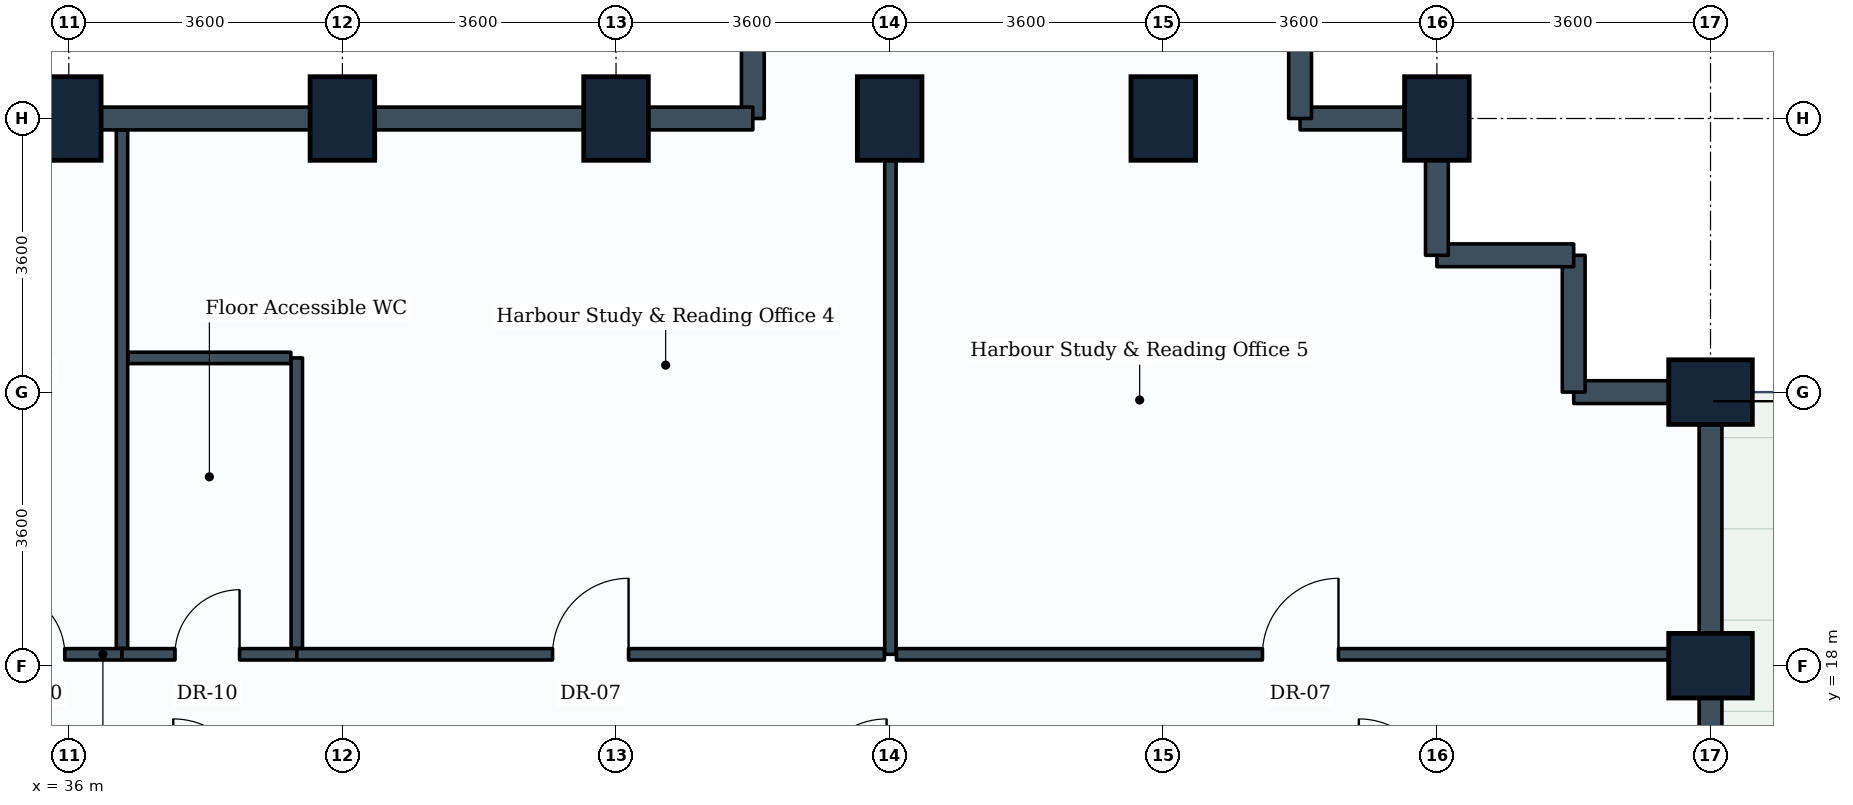
"""IFC4 building model, lengths in metres.
Left out: names, types, materials, properties, quantities, classifications, styles, units other than length and angle.
Written with IfcOpenShell. Run it as: python <this file> out.ifc"""

import sys

from ifc_helpers import new_model, si_unit, direction, frame, frame_2d, origin, origin_2d, place, context, subcontext, project, spatial, rectangle, extrude, element, fill, save


model = new_model("IFC4")
c1 = context("Model", 3, precision=1e-05, world=origin(), true_north=direction((0.0, 1.0)))
c2 = subcontext(c1, "Body", "Model", "MODEL_VIEW")
j1 = project(units=[si_unit("LENGTHUNIT", "METRE"), si_unit("PLANEANGLEUNIT", "RADIAN")], contexts=[c1])
p1 = place(None, origin())
s1 = spatial("IfcSite", under=j1, at=p1, CompositionType="ELEMENT")
p2 = place(p1, origin())
s2 = spatial("IfcBuilding", under=s1, at=p2, CompositionType="ELEMENT")
p3 = place(p2, frame((0.0, 0.0, 107.4)))
s3 = spatial("IfcBuildingStorey", under=s2, at=p3, CompositionType="ELEMENT", Elevation=107.4)
for number, where, z_axis, x_axis in (
    (1, (36.0, 25.2, 0.0), (0.0, 0.0, 1.0), (1.0, 0.0, 0.0)),
    (2, (39.6, 25.2, 0.0), (0.0, 0.0, 1.0), (1.0, 0.0, 0.0)),
    (3, (43.2, 25.2, 0.0), (0.0, 0.0, 1.0), (1.0, 0.0, 0.0)),
    (4, (46.8, 25.2, 0.0), (0.0, 0.0, 1.0), (1.0, 0.0, 0.0)),
    (5, (50.4, 25.2, 0.0), (0.0, 0.0, 1.0), (1.0, 0.0, 0.0)),
    (6, (54.0, 25.2, 0.0), (0.0, 0.0, 1.0), (1.0, 0.0, 0.0)),
    (7, (57.6, 18.0, 0.0), (0.0, 0.0, 1.0), (0.0, 1.0, 0.0)),
    (8, (57.6, 21.6, 0.0), (0.0, 0.0, 1.0), (0.0, 1.0, 0.0)),
):
    element("IfcColumn", number, at=place(p3, frame(where, z_axis=z_axis, x_axis=x_axis)), inside=s3, PredefinedType="COLUMN", context=c2, shape_type="SweptSolid", body=[
        extrude(rectangle(XDim=0.85, YDim=1.1, at=origin_2d()), origin(), (0.0, 0.0, 1.0), 3.9),
    ])
for number, where, z_axis, x_axis in (
    (9, (57.6, 18.0, 0.0), (0.0, 0.0, 1.0), (0.0, -1.0, 0.0)),
    (10, (57.6, 21.6, 0.0), (0.0, 0.0, 1.0), (0.0, -1.0, 0.0)),
):
    element("IfcWall", number, at=place(p3, frame(where, z_axis=z_axis, x_axis=x_axis)), inside=s3, PredefinedType="STANDARD", context=c2, shape_type="SweptSolid", body=[
        extrude(rectangle(XDim=3.6, YDim=0.3, at=frame_2d((1.8, 0.0))), origin(), (0.0, 0.0, 1.0), 2.93),
    ])
p4 = place(p3, frame((55.8, 21.6, 0.0), z_axis=(0.0, 0.0, 1.0), x_axis=(1.0, 0.0, 0.0)))
e11 = element("IfcWall", 11, at=p4, inside=s3, PredefinedType="STANDARD", context=c2, shape_type="SweptSolid", body=[
    extrude(rectangle(XDim=1.8, YDim=0.3, at=frame_2d((0.9, 0.0))), origin(), (0.0, 0.0, 1.0), 2.93),
])
p5 = place(p3, frame((55.8, 23.4, 0.0), z_axis=(0.0, 0.0, 1.0), x_axis=(0.0, -1.0, 0.0)))
e12 = element("IfcWall", 12, at=p5, inside=s3, PredefinedType="STANDARD", context=c2, shape_type="SweptSolid", body=[
    extrude(rectangle(XDim=1.8, YDim=0.3, at=frame_2d((0.9, 0.0))), origin(), (0.0, 0.0, 1.0), 3.635),
])
p6 = place(p3, frame((54.0, 23.4, 0.0), z_axis=(0.0, 0.0, 1.0), x_axis=(1.0, 0.0, 0.0)))
e13 = element("IfcWall", 13, at=p6, inside=s3, PredefinedType="STANDARD", context=c2, shape_type="SweptSolid", body=[
    extrude(rectangle(XDim=1.8, YDim=0.3, at=frame_2d((0.9, 0.0))), origin(), (0.0, 0.0, 1.0), 3.635),
])
for number, where, z_axis, x_axis in (
    (14, (54.0, 25.2, 0.0), (0.0, 0.0, 1.0), (0.0, -1.0, 0.0)),
    (15, (52.2, 25.2, 0.0), (0.0, 0.0, 1.0), (1.0, 0.0, 0.0)),
):
    element("IfcWall", number, at=place(p3, frame(where, z_axis=z_axis, x_axis=x_axis)), inside=s3, PredefinedType="STANDARD", context=c2, shape_type="SweptSolid", body=[
        extrude(rectangle(XDim=1.8, YDim=0.3, at=frame_2d((0.9, 0.0))), origin(), (0.0, 0.0, 1.0), 2.93),
    ])
for number, where, z_axis, x_axis in (
    (16, (52.2, 27.3, 0.0), (0.0, 0.0, 1.0), (0.0, -1.0, 0.0)),
    (17, (45.0, 27.3, 0.0), (0.0, 0.0, 1.0), (0.0, -1.0, 0.0)),
):
    element("IfcWall", number, at=place(p3, frame(where, z_axis=z_axis, x_axis=x_axis)), inside=s3, PredefinedType="STANDARD", context=c2, shape_type="SweptSolid", body=[
        extrude(rectangle(XDim=2.1, YDim=0.3, at=frame_2d((1.05, 0.0))), origin(), (0.0, 0.0, 1.0), 2.93),
    ])
p7 = place(p3, frame((43.2, 25.2, 0.0), z_axis=(0.0, 0.0, 1.0), x_axis=(1.0, 0.0, 0.0)))
e18 = element("IfcWall", 18, at=p7, inside=s3, PredefinedType="STANDARD", context=c2, shape_type="SweptSolid", body=[
    extrude(rectangle(XDim=1.8, YDim=0.3, at=frame_2d((0.9, 0.0))), origin(), (0.0, 0.0, 1.0), 2.93),
])
p8 = place(p3, frame((39.6, 25.2, 0.0), z_axis=(0.0, 0.0, 1.0), x_axis=(1.0, 0.0, 0.0)))
e19 = element("IfcWall", 19, at=p8, inside=s3, PredefinedType="STANDARD", context=c2, shape_type="SweptSolid", body=[
    extrude(rectangle(XDim=3.6, YDim=0.3, at=frame_2d((1.8, 0.0))), origin(), (0.0, 0.0, 1.0), 2.93),
])
for number, where, z_axis, x_axis in (
    (20, (36.0, 25.2, 0.0), (0.0, 0.0, 1.0), (1.0, 0.0, 0.0)),
    (21, (32.4, 25.2, 0.0), (0.0, 0.0, 1.0), (1.0, 0.0, 0.0)),
):
    element("IfcWall", number, at=place(p3, frame(where, z_axis=z_axis, x_axis=x_axis)), inside=s3, PredefinedType="STANDARD", context=c2, shape_type="SweptSolid", body=[
        extrude(rectangle(XDim=3.6, YDim=0.3, at=frame_2d((1.8, 0.0))), origin(), (0.0, 0.0, 1.0), 2.93),
    ])
p9 = place(p3, frame((34.479, 18.15, 0.0), z_axis=(0.0, 0.0, 1.0), x_axis=(1.0, 0.0, 0.0)))
e22 = element("IfcWall", 22, at=p9, inside=s3, PredefinedType="PARTITIONING", context=c2, shape_type="SweptSolid", body=[
    extrude(rectangle(XDim=2.221, YDim=0.15, at=frame_2d((1.11, 0.0))), origin(), (0.0, 0.0, 1.0), 3.18),
])
p10 = place(p9, frame((0.618, 0.0, 0.0)))
e23 = element("IfcOpeningElement", 23, at=p10, cuts=e22, PredefinedType="OPENING", context=c2, shape_type="SweptSolid", body=[
    extrude(rectangle(XDim=0.85, YDim=2.1, at=frame_2d((0.425, 1.05))), frame((0.0, 0.085, 0.0), z_axis=(0.0, -1.0, 0.0), x_axis=(1.0, 0.0, 0.0)), (0.0, 0.0, 1.0), 0.17),
])
p11 = place(p3, frame((36.7, 18.229, 0.0), z_axis=(0.0, 0.0, 1.0), x_axis=(0.0, 1.0, 0.0)))
e24 = element("IfcWall", 24, at=p11, inside=s3, PredefinedType="PARTITIONING", context=c2, shape_type="SweptSolid", body=[
    extrude(rectangle(XDim=6.817, YDim=0.15, at=frame_2d((3.408, 0.0))), origin(), (0.0, 0.0, 1.0), 2.93),
])
p12 = place(p3, frame((36.7, 18.15, 0.0), z_axis=(0.0, 0.0, 1.0), x_axis=(1.0, 0.0, 0.0)))
e25 = element("IfcWall", 25, at=p12, inside=s3, PredefinedType="PARTITIONING", context=c2, shape_type="SweptSolid", body=[
    extrude(rectangle(XDim=2.3, YDim=0.15, at=frame_2d((1.15, 0.0))), origin(), (0.0, 0.0, 1.0), 3.27),
])
p13 = place(p12, frame((0.697, 0.0, 0.0)))
e26 = element("IfcOpeningElement", 26, at=p13, cuts=e25, PredefinedType="OPENING", context=c2, shape_type="SweptSolid", body=[
    extrude(rectangle(XDim=0.85, YDim=2.1, at=frame_2d((0.425, 1.05))), frame((0.0, 0.085, 0.0), z_axis=(0.0, -1.0, 0.0), x_axis=(1.0, 0.0, 0.0)), (0.0, 0.0, 1.0), 0.17),
])
p14 = place(p3, frame((39.0, 18.229, 0.0), z_axis=(0.0, 0.0, 1.0), x_axis=(0.0, 1.0, 0.0)))
e27 = element("IfcWall", 27, at=p14, inside=s3, PredefinedType="PARTITIONING", context=c2, shape_type="SweptSolid", body=[
    extrude(rectangle(XDim=3.821, YDim=0.15, at=frame_2d((1.911, 0.0))), origin(), (0.0, 0.0, 1.0), 3.18),
])
p15 = place(p3, frame((36.779, 22.05, 0.0), z_axis=(0.0, 0.0, 1.0), x_axis=(1.0, 0.0, 0.0)))
e28 = element("IfcWall", 28, at=p15, inside=s3, PredefinedType="PARTITIONING", context=c2, shape_type="SweptSolid", body=[
    extrude(rectangle(XDim=2.142, YDim=0.15, at=frame_2d((1.071, 0.0))), origin(), (0.0, 0.0, 1.0), 3.635),
])
p16 = place(p3, frame((46.81, 18.15, 0.0), z_axis=(0.0, 0.0, 1.0), x_axis=(0.0, 1.0, 0.0)))
e29 = element("IfcWall", 29, at=p16, inside=s3, PredefinedType="PARTITIONING", context=c2, shape_type="SweptSolid", body=[
    extrude(rectangle(XDim=7.05, YDim=0.15, at=frame_2d((3.525, 0.0))), origin(), (0.0, 0.0, 1.0), 3.19),
])
p17 = place(p3, frame((39.0, 18.15, 0.0), z_axis=(0.0, 0.0, 1.0), x_axis=(1.0, 0.0, 0.0)))
e30 = element("IfcWall", 30, at=p17, inside=s3, PredefinedType="PARTITIONING", context=c2, shape_type="SweptSolid", body=[
    extrude(rectangle(XDim=7.731, YDim=0.15, at=frame_2d((3.865, 0.0))), origin(), (0.0, 0.0, 1.0), 3.18),
])
p18 = place(p17, frame((3.365, 0.0, 0.0)))
e31 = element("IfcOpeningElement", 31, at=p18, cuts=e30, PredefinedType="OPENING", context=c2, shape_type="SweptSolid", body=[
    extrude(rectangle(XDim=1.0, YDim=2.1, at=frame_2d((0.5, 1.05))), frame((0.0, 0.085, 0.0), z_axis=(0.0, -1.0, 0.0), x_axis=(1.0, 0.0, 0.0)), (0.0, 0.0, 1.0), 0.17),
])
p19 = place(p3, frame((46.889, 18.15, 0.0), z_axis=(0.0, 0.0, 1.0), x_axis=(1.0, 0.0, 0.0)))
e32 = element("IfcWall", 32, at=p19, inside=s3, PredefinedType="PARTITIONING", context=c2, shape_type="SweptSolid", body=[
    extrude(rectangle(XDim=10.557, YDim=0.15, at=frame_2d((5.279, 0.0))), origin(), (0.0, 0.0, 1.0), 2.93),
])
p20 = place(p19, frame((4.816, 0.0, 0.0)))
e33 = element("IfcOpeningElement", 33, at=p20, cuts=e32, PredefinedType="OPENING", context=c2, shape_type="SweptSolid", body=[
    extrude(rectangle(XDim=1.0, YDim=2.1, at=frame_2d((0.5, 1.05))), frame((0.0, 0.085, 0.0), z_axis=(0.0, -1.0, 0.0), x_axis=(1.0, 0.0, 0.0)), (0.0, 0.0, 1.0), 0.17),
])
p21 = place(p10, origin())
e34 = element("IfcDoor", 34, at=p21, inside=s3, OperationType="SINGLE_SWING_LEFT", PredefinedType="DOOR", context=c2, shape_type="SweptSolid", body=[
    extrude(rectangle(XDim=0.85, YDim=2.1, at=frame_2d((0.425, 1.05))), frame((0.0, 0.025, 0.0), z_axis=(0.0, -1.0, 0.0), x_axis=(1.0, 0.0, 0.0)), (0.0, 0.0, 1.0), 0.05),
])
fill(e23, e34)
p22 = place(p13, origin())
e35 = element("IfcDoor", 35, at=p22, inside=s3, OperationType="SINGLE_SWING_RIGHT", PredefinedType="DOOR", context=c2, shape_type="SweptSolid", body=[
    extrude(rectangle(XDim=0.85, YDim=2.1, at=frame_2d((0.425, 1.05))), frame((0.0, 0.025, 0.0), z_axis=(0.0, -1.0, 0.0), x_axis=(1.0, 0.0, 0.0)), (0.0, 0.0, 1.0), 0.05),
])
fill(e26, e35)
p23 = place(p18, origin())
e36 = element("IfcDoor", 36, at=p23, inside=s3, OperationType="SINGLE_SWING_RIGHT", PredefinedType="DOOR", context=c2, shape_type="SweptSolid", body=[
    extrude(rectangle(XDim=1.0, YDim=2.1, at=frame_2d((0.5, 1.05))), frame((0.0, 0.025, 0.0), z_axis=(0.0, -1.0, 0.0), x_axis=(1.0, 0.0, 0.0)), (0.0, 0.0, 1.0), 0.05),
])
fill(e31, e36)
p24 = place(p20, origin())
e37 = element("IfcDoor", 37, at=p24, inside=s3, OperationType="SINGLE_SWING_RIGHT", PredefinedType="DOOR", context=c2, shape_type="SweptSolid", body=[
    extrude(rectangle(XDim=1.0, YDim=2.1, at=frame_2d((0.5, 1.05))), frame((0.0, 0.025, 0.0), z_axis=(0.0, -1.0, 0.0), x_axis=(1.0, 0.0, 0.0)), (0.0, 0.0, 1.0), 0.05),
])
fill(e33, e37)
save(model, sys.argv[1])
